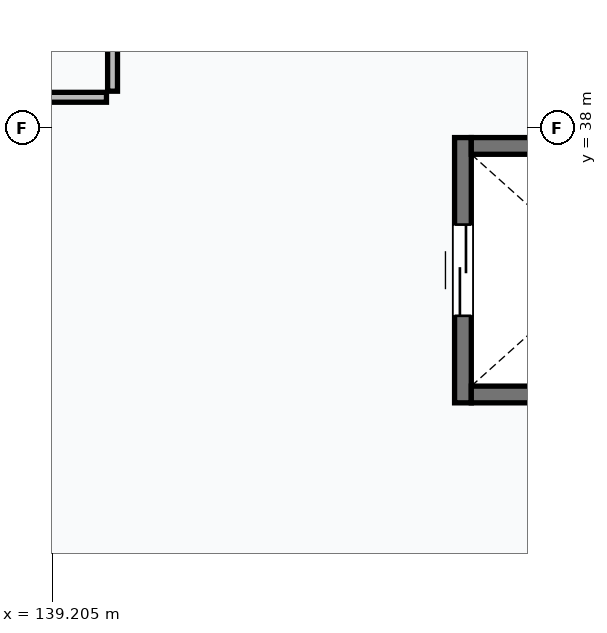
"""IFC4 building model, lengths in metres.
Left out: names, types, materials, properties, quantities, classifications, styles, units other than length and angle.
Written with IfcOpenShell. Run it as: python <this file> out.ifc"""

import sys

from ifc_helpers import new_model, si_unit, direction, frame, frame_2d, origin, place, context, subcontext, project, spatial, rectangle, extrude, element, fill, save


model = new_model("IFC4")
c1 = context("Model", 3, precision=1e-05, world=origin(), true_north=direction((0.0, 1.0)))
c2 = subcontext(c1, "Body", "Model", "MODEL_VIEW")
j1 = project(units=[si_unit("LENGTHUNIT", "METRE"), si_unit("PLANEANGLEUNIT", "RADIAN")], contexts=[c1])
p1 = place(None, origin())
s1 = spatial("IfcSite", under=j1, at=p1, CompositionType="ELEMENT")
p2 = place(p1, origin())
s2 = spatial("IfcBuilding", under=s1, at=p2, CompositionType="ELEMENT")
p3 = place(p2, frame((0.0, 0.0, 8.4)))
s3 = spatial("IfcBuildingStorey", under=s2, at=p3, CompositionType="ELEMENT", Elevation=8.4)
p4 = place(p3, frame((144.61, 34.38, 0.0), z_axis=(0.0, 0.0, 1.0), x_axis=(0.0, 1.0, 0.0)))
e1 = element("IfcWall", 1, at=p4, inside=s3, PredefinedType="SHEAR", context=c2, shape_type="SweptSolid", body=[
    extrude(rectangle(XDim=3.49, YDim=0.22, at=frame_2d((1.745, 0.0))), origin(), (0.0, 0.0, 1.0), 3.6),
])
p5 = place(p4, frame((1.145, 0.0, 0.0)))
e2 = element("IfcOpeningElement", 2, at=p5, cuts=e1, PredefinedType="OPENING", context=c2, shape_type="SweptSolid", body=[
    extrude(rectangle(XDim=1.2, YDim=2.2, at=frame_2d((0.6, 1.1))), frame((0.0, 0.12, 0.0), z_axis=(0.0, -1.0, 0.0), x_axis=(1.0, 0.0, 0.0)), (0.0, 0.0, 1.0), 0.24),
])
for number, where, z_axis, x_axis in (
    (3, (148.12, 34.49, 0.0), (0.0, 0.0, 1.0), (-1.0, 0.0, 0.0)),
    (4, (144.72, 37.76, 0.0), (0.0, 0.0, 1.0), (1.0, 0.0, 0.0)),
):
    element("IfcWall", number, at=place(p3, frame(where, z_axis=z_axis, x_axis=x_axis)), inside=s3, PredefinedType="SHEAR", context=c2, shape_type="SweptSolid", body=[
        extrude(rectangle(XDim=3.4, YDim=0.22, at=frame_2d((1.7, 0.0))), origin(), (0.0, 0.0, 1.0), 3.6),
    ])
p6 = place(p3, frame((132.08, 38.4, 0.0), z_axis=(0.0, 0.0, 1.0), x_axis=(1.0, 0.0, 0.0)))
e5 = element("IfcWall", 5, at=p6, inside=s3, PredefinedType="PARTITIONING", context=c2, shape_type="SweptSolid", body=[
    extrude(rectangle(XDim=7.84, YDim=0.13, at=frame_2d((3.92, 0.0))), origin(), (0.0, 0.0, 1.0), 3.345),
])
p7 = place(p3, frame((140.0, 38.48, 0.0), z_axis=(0.0, 0.0, 1.0), x_axis=(0.0, 1.0, 0.0)))
e6 = element("IfcWall", 6, at=p7, inside=s3, PredefinedType="PARTITIONING", context=c2, shape_type="SweptSolid", body=[
    extrude(rectangle(XDim=13.44, YDim=0.13, at=frame_2d((6.72, 0.0))), origin(), (0.0, 0.0, 1.0), 2.395),
])
p8 = place(p5, origin())
e7 = element("IfcDoor", 7, at=p8, inside=s3, OperationType="DOUBLE_DOOR_SLIDING", PredefinedType="DOOR", context=c2, shape_type="SweptSolid", body=[
    extrude(rectangle(XDim=1.2, YDim=2.2, at=frame_2d((0.6, 1.1))), frame((0.0, 0.025, 0.0), z_axis=(0.0, -1.0, 0.0), x_axis=(1.0, 0.0, 0.0)), (0.0, 0.0, 1.0), 0.05),
])
fill(e2, e7)
save(model, sys.argv[1])
